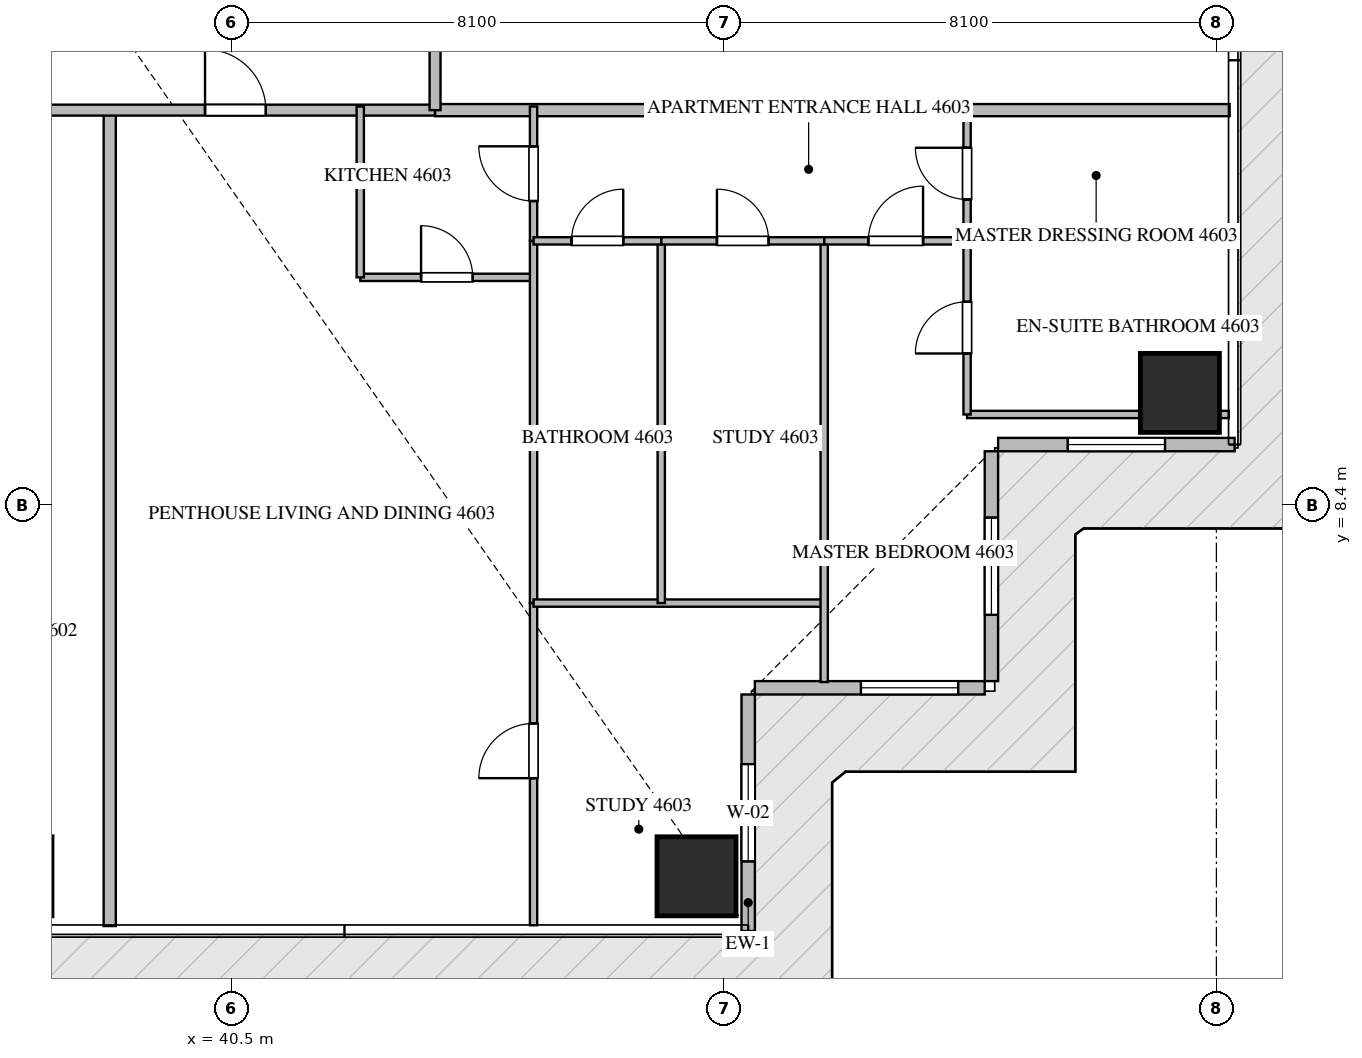
"""IFC4 building model, lengths in metres.
Left out: names, types, materials, properties, quantities, classifications, styles, units other than length and angle.
Written with IfcOpenShell. Run it as: python <this file> out.ifc"""

import sys

from ifc_helpers import new_model, si_unit, direction, frame, frame_2d, origin, origin_2d, place, context, subcontext, project, spatial, rectangle, extrude, source, transform, mapped, element, fill, save


model = new_model("IFC4")
c1 = context("Model", 3, precision=1e-05, world=origin(), true_north=direction((0.0, 1.0)))
c2 = subcontext(c1, "Body", "Model", "MODEL_VIEW")
j1 = project(units=[si_unit("LENGTHUNIT", "METRE"), si_unit("PLANEANGLEUNIT", "RADIAN")], contexts=[c1])
p1 = place(None, origin())
s1 = spatial("IfcSite", under=j1, at=p1, CompositionType="ELEMENT")
p2 = place(p1, origin())
s2 = spatial("IfcBuilding", under=s1, at=p2, CompositionType="ELEMENT")
p3 = place(p2, frame((0.0, 0.0, 183.9)))
s3 = spatial("IfcBuildingStorey", under=s2, at=p3, CompositionType="ELEMENT", Elevation=183.9)
m1 = source(origin(), c2, "Body", "SweptSolid", [
    extrude(rectangle(XDim=1.3, YDim=1.3, at=origin_2d()), origin(), (0.0, 0.0, 1.0), 3.75),
])
for number, where, z_axis, x_axis in (
    (1, (48.15, 2.3, -0.26), (0.0, 0.0, 1.0), (1.0, 0.0, 0.0)),
    (2, (56.1, 10.25, -0.26), (0.0, 0.0, 1.0), (1.0, 0.0, 0.0)),
):
    element("IfcColumn", number, at=place(p3, frame(where, z_axis=z_axis, x_axis=x_axis)), inside=s3, PredefinedType="COLUMN", context=c2, shape_type="MappedRepresentation", body=[
        mapped(m1, transform((0.0, 0.0, 0.0), scale=1.0)),
    ])
p4 = place(p3, frame((49.0, 1.4, 0.0), z_axis=(0.0, 0.0, 1.0), x_axis=(0.0, 1.0, 0.0)))
e3 = element("IfcWall", 3, at=p4, inside=s3, PredefinedType="ELEMENTEDWALL", context=c2, shape_type="SweptSolid", body=[
    extrude(rectangle(XDim=3.89, YDim=0.22, at=frame_2d((1.945, 0.0))), origin(), (0.0, 0.0, 1.0), 3.475),
])
p5 = place(p4, frame((1.145, 0.0, 0.65)))
e4 = element("IfcOpeningElement", 4, at=p5, cuts=e3, PredefinedType="OPENING", context=c2, shape_type="SweptSolid", body=[
    extrude(rectangle(XDim=1.6, YDim=2.1, at=frame_2d((0.8, 1.05))), frame((0.0, 0.12, 0.0), z_axis=(0.0, -1.0, 0.0), x_axis=(1.0, 0.0, 0.0)), (0.0, 0.0, 1.0), 0.24),
])
p6 = place(p3, frame((49.11, 5.4, 0.0), z_axis=(0.0, 0.0, 1.0), x_axis=(1.0, 0.0, 0.0)))
e5 = element("IfcWall", 5, at=p6, inside=s3, PredefinedType="ELEMENTEDWALL", context=c2, shape_type="SweptSolid", body=[
    extrude(rectangle(XDim=3.78, YDim=0.22, at=frame_2d((1.89, 0.0))), origin(), (0.0, 0.0, 1.0), 3.475),
])
p7 = place(p6, frame((1.744, 0.0, 0.65)))
e6 = element("IfcOpeningElement", 6, at=p7, cuts=e5, PredefinedType="OPENING", context=c2, shape_type="SweptSolid", body=[
    extrude(rectangle(XDim=1.6, YDim=2.1, at=frame_2d((0.8, 1.05))), frame((0.0, 0.12, 0.0), z_axis=(0.0, -1.0, 0.0), x_axis=(1.0, 0.0, 0.0)), (0.0, 0.0, 1.0), 0.24),
])
p8 = place(p3, frame((53.0, 5.51, 0.0), z_axis=(0.0, 0.0, 1.0), x_axis=(0.0, 1.0, 0.0)))
e7 = element("IfcWall", 7, at=p8, inside=s3, PredefinedType="ELEMENTEDWALL", context=c2, shape_type="SweptSolid", body=[
    extrude(rectangle(XDim=3.78, YDim=0.22, at=frame_2d((1.89, 0.0))), origin(), (0.0, 0.0, 1.0), 3.475),
])
p9 = place(p8, frame((1.09, 0.0, 0.65)))
e8 = element("IfcOpeningElement", 8, at=p9, cuts=e7, PredefinedType="OPENING", context=c2, shape_type="SweptSolid", body=[
    extrude(rectangle(XDim=1.6, YDim=2.1, at=frame_2d((0.8, 1.05))), frame((0.0, 0.12, 0.0), z_axis=(0.0, -1.0, 0.0), x_axis=(1.0, 0.0, 0.0)), (0.0, 0.0, 1.0), 0.24),
])
p10 = place(p3, frame((53.11, 9.4, 0.0), z_axis=(0.0, 0.0, 1.0), x_axis=(1.0, 0.0, 0.0)))
e9 = element("IfcWall", 9, at=p10, inside=s3, PredefinedType="ELEMENTEDWALL", context=c2, shape_type="SweptSolid", body=[
    extrude(rectangle(XDim=3.89, YDim=0.22, at=frame_2d((1.945, 0.0))), origin(), (0.0, 0.0, 1.0), 3.475),
])
p11 = place(p10, frame((1.145, 0.0, 0.65)))
e10 = element("IfcOpeningElement", 10, at=p11, cuts=e9, PredefinedType="OPENING", context=c2, shape_type="SweptSolid", body=[
    extrude(rectangle(XDim=1.6, YDim=2.1, at=frame_2d((0.8, 1.05))), frame((0.0, 0.12, 0.0), z_axis=(0.0, -1.0, 0.0), x_axis=(1.0, 0.0, 0.0)), (0.0, 0.0, 1.0), 0.24),
])
p12 = place(p3, frame((38.5, 1.482, 0.0), z_axis=(0.0, 0.0, 1.0), x_axis=(0.0, 1.0, 0.0)))
e11 = element("IfcWall", 11, at=p12, inside=s3, PredefinedType="PARTITIONING", context=c2, shape_type="SweptSolid", body=[
    extrude(rectangle(XDim=13.418, YDim=0.2, at=frame_2d((6.709, 0.0))), origin(), (0.0, 0.0, 1.0), 3.49),
])
p13 = place(p3, frame((43.85, 14.9, 0.0), z_axis=(0.0, 0.0, 1.0), x_axis=(1.0, 0.0, 0.0)))
e12 = element("IfcWall", 12, at=p13, inside=s3, PredefinedType="PARTITIONING", context=c2, shape_type="SweptSolid", body=[
    extrude(rectangle(XDim=13.068, YDim=0.2, at=frame_2d((6.534, 0.0))), origin(), (0.0, 0.0, 1.0), 3.49),
])
p14 = place(p3, frame((20.952, 14.9, 0.0), z_axis=(0.0, 0.0, 1.0), x_axis=(1.0, 0.0, 0.0)))
e13 = element("IfcWall", 13, at=p14, inside=s3, PredefinedType="PARTITIONING", context=c2, shape_type="SweptSolid", body=[
    extrude(rectangle(XDim=22.896, YDim=0.18, at=frame_2d((11.448, 0.0))), origin(), (0.0, 0.0, 1.0), 3.49),
])
p15 = place(p14, frame((2.781, 0.0, 0.0)))
e14 = element("IfcOpeningElement", 14, at=p15, cuts=e13, PredefinedType="OPENING", context=c2, shape_type="SweptSolid", body=[
    extrude(rectangle(XDim=1.0, YDim=2.15, at=frame_2d((0.5, 1.075))), frame((0.0, 0.1, 0.0), z_axis=(0.0, -1.0, 0.0), x_axis=(1.0, 0.0, 0.0)), (0.0, 0.0, 1.0), 0.2),
])
p16 = place(p14, frame((14.736, 0.0, 0.0)))
e15 = element("IfcOpeningElement", 15, at=p16, cuts=e13, PredefinedType="OPENING", context=c2, shape_type="SweptSolid", body=[
    extrude(rectangle(XDim=1.0, YDim=2.15, at=frame_2d((0.5, 1.075))), frame((0.0, 0.1, 0.0), z_axis=(0.0, -1.0, 0.0), x_axis=(1.0, 0.0, 0.0)), (0.0, 0.0, 1.0), 0.2),
])
p17 = place(p14, frame((19.115, 0.0, 0.0)))
e16 = element("IfcOpeningElement", 16, at=p17, cuts=e13, PredefinedType="OPENING", context=c2, shape_type="SweptSolid", body=[
    extrude(rectangle(XDim=1.0, YDim=2.15, at=frame_2d((0.5, 1.075))), frame((0.0, 0.1, 0.0), z_axis=(0.0, -1.0, 0.0), x_axis=(1.0, 0.0, 0.0)), (0.0, 0.0, 1.0), 0.2),
])
p18 = place(p3, frame((43.85, 14.9, 0.0), z_axis=(0.0, 0.0, 1.0), x_axis=(0.0, 1.0, 0.0)))
e17 = element("IfcWall", 17, at=p18, inside=s3, PredefinedType="PARTITIONING", context=c2, shape_type="SweptSolid", body=[
    extrude(rectangle(XDim=18.7, YDim=0.18, at=frame_2d((9.35, 0.0))), origin(), (0.0, 0.0, 1.0), 3.49),
])
p19 = place(p18, frame((1.805, 0.0, 0.0)))
e18 = element("IfcOpeningElement", 18, at=p19, cuts=e17, PredefinedType="OPENING", context=c2, shape_type="SweptSolid", body=[
    extrude(rectangle(XDim=1.0, YDim=2.15, at=frame_2d((0.5, 1.075))), frame((0.0, 0.1, 0.0), z_axis=(0.0, -1.0, 0.0), x_axis=(1.0, 0.0, 0.0)), (0.0, 0.0, 1.0), 0.2),
])
p20 = place(p18, frame((14.726, 0.0, 0.0)))
e19 = element("IfcOpeningElement", 19, at=p20, cuts=e17, PredefinedType="OPENING", context=c2, shape_type="SweptSolid", body=[
    extrude(rectangle(XDim=1.0, YDim=2.15, at=frame_2d((0.5, 1.075))), frame((0.0, 0.1, 0.0), z_axis=(0.0, -1.0, 0.0), x_axis=(1.0, 0.0, 0.0)), (0.0, 0.0, 1.0), 0.2),
])
p21 = place(p3, frame((42.62, 12.15, 0.0), z_axis=(0.0, 0.0, 1.0), x_axis=(1.0, 0.0, 0.0)))
e20 = element("IfcWall", 20, at=p21, inside=s3, PredefinedType="PARTITIONING", context=c2, shape_type="SweptSolid", body=[
    extrude(rectangle(XDim=2.85, YDim=0.12, at=frame_2d((1.425, 0.0))), origin(), (0.0, 0.0, 1.0), 3.49),
])
p22 = place(p21, frame((1.0, 0.0, 0.0)))
e21 = element("IfcOpeningElement", 21, at=p22, cuts=e20, PredefinedType="OPENING", context=c2, shape_type="SweptSolid", body=[
    extrude(rectangle(XDim=0.85, YDim=2.1, at=frame_2d((0.425, 1.05))), frame((0.0, 0.07, 0.0), z_axis=(0.0, -1.0, 0.0), x_axis=(1.0, 0.0, 0.0)), (0.0, 0.0, 1.0), 0.14),
])
p23 = place(p3, frame((42.62, 12.15, 0.0), z_axis=(0.0, 0.0, 1.0), x_axis=(0.0, 1.0, 0.0)))
e22 = element("IfcWall", 22, at=p23, inside=s3, PredefinedType="PARTITIONING", context=c2, shape_type="SweptSolid", body=[
    extrude(rectangle(XDim=2.81, YDim=0.12, at=frame_2d((1.405, 0.0))), origin(), (0.0, 0.0, 1.0), 3.49),
])
p24 = place(p3, frame((45.47, 12.75, 0.0), z_axis=(0.0, 0.0, 1.0), x_axis=(0.0, 1.0, 0.0)))
e23 = element("IfcWall", 23, at=p24, inside=s3, PredefinedType="PARTITIONING", context=c2, shape_type="SweptSolid", body=[
    extrude(rectangle(XDim=2.21, YDim=0.12, at=frame_2d((1.105, 0.0))), origin(), (0.0, 0.0, 1.0), 3.49),
])
p25 = place(p24, frame((0.655, 0.0, 0.0)))
e24 = element("IfcOpeningElement", 24, at=p25, cuts=e23, PredefinedType="OPENING", context=c2, shape_type="SweptSolid", body=[
    extrude(rectangle(XDim=0.9, YDim=2.1, at=frame_2d((0.45, 1.05))), frame((0.0, 0.07, 0.0), z_axis=(0.0, -1.0, 0.0), x_axis=(1.0, 0.0, 0.0)), (0.0, 0.0, 1.0), 0.14),
])
p26 = place(p3, frame((45.47, 1.495, 0.0), z_axis=(0.0, 0.0, 1.0), x_axis=(0.0, 1.0, 0.0)))
e25 = element("IfcWall", 25, at=p26, inside=s3, PredefinedType="PARTITIONING", context=c2, shape_type="SweptSolid", body=[
    extrude(rectangle(XDim=5.298, YDim=0.12, at=frame_2d((2.649, 0.0))), origin(), (0.0, 0.0, 1.0), 3.49),
])
p27 = place(p26, frame((2.419, 0.0, 0.0)))
e26 = element("IfcOpeningElement", 26, at=p27, cuts=e25, PredefinedType="OPENING", context=c2, shape_type="SweptSolid", body=[
    extrude(rectangle(XDim=0.9, YDim=2.1, at=frame_2d((0.45, 1.05))), frame((0.0, 0.07, 0.0), z_axis=(0.0, -1.0, 0.0), x_axis=(1.0, 0.0, 0.0)), (0.0, 0.0, 1.0), 0.14),
])
p28 = place(p3, frame((45.47, 6.795, 0.0), z_axis=(0.0, 0.0, 1.0), x_axis=(0.0, 1.0, 0.0)))
e27 = element("IfcWall", 27, at=p28, inside=s3, PredefinedType="PARTITIONING", context=c2, shape_type="SweptSolid", body=[
    extrude(rectangle(XDim=5.953, YDim=0.12, at=frame_2d((2.977, 0.0))), origin(), (0.0, 0.0, 1.0), 3.49),
])
p29 = place(p3, frame((45.47, 6.793, 0.0), z_axis=(0.0, 0.0, 1.0), x_axis=(1.0, 0.0, 0.0)))
e28 = element("IfcWall", 28, at=p29, inside=s3, PredefinedType="PARTITIONING", context=c2, shape_type="SweptSolid", body=[
    extrude(rectangle(XDim=4.78, YDim=0.12, at=frame_2d((2.39, 0.0))), origin(), (0.0, 0.0, 1.0), 3.49),
])
p30 = place(p3, frame((50.25, 5.495, 0.0), z_axis=(0.0, 0.0, 1.0), x_axis=(0.0, 1.0, 0.0)))
e29 = element("IfcWall", 29, at=p30, inside=s3, PredefinedType="PARTITIONING", context=c2, shape_type="SweptSolid", body=[
    extrude(rectangle(XDim=7.255, YDim=0.12, at=frame_2d((3.627, 0.0))), origin(), (0.0, 0.0, 1.0), 3.49),
])
p31 = place(p3, frame((47.57, 6.793, 0.0), z_axis=(0.0, 0.0, 1.0), x_axis=(0.0, 1.0, 0.0)))
e30 = element("IfcWall", 30, at=p31, inside=s3, PredefinedType="PARTITIONING", context=c2, shape_type="SweptSolid", body=[
    extrude(rectangle(XDim=5.957, YDim=0.12, at=frame_2d((2.979, 0.0))), origin(), (0.0, 0.0, 1.0), 3.49),
])
p32 = place(p3, frame((45.47, 12.75, 0.0), z_axis=(0.0, 0.0, 1.0), x_axis=(1.0, 0.0, 0.0)))
e31 = element("IfcWall", 31, at=p32, inside=s3, PredefinedType="PARTITIONING", context=c2, shape_type="SweptSolid", body=[
    extrude(rectangle(XDim=2.1, YDim=0.12, at=frame_2d((1.05, 0.0))), origin(), (0.0, 0.0, 1.0), 3.49),
])
p33 = place(p32, frame((0.625, 0.0, 0.0)))
e32 = element("IfcOpeningElement", 32, at=p33, cuts=e31, PredefinedType="OPENING", context=c2, shape_type="SweptSolid", body=[
    extrude(rectangle(XDim=0.85, YDim=2.1, at=frame_2d((0.425, 1.05))), frame((0.0, 0.07, 0.0), z_axis=(0.0, -1.0, 0.0), x_axis=(1.0, 0.0, 0.0)), (0.0, 0.0, 1.0), 0.14),
])
p34 = place(p3, frame((47.572, 12.75, 0.0), z_axis=(0.0, 0.0, 1.0), x_axis=(1.0, 0.0, 0.0)))
e33 = element("IfcWall", 33, at=p34, inside=s3, PredefinedType="PARTITIONING", context=c2, shape_type="SweptSolid", body=[
    extrude(rectangle(XDim=2.678, YDim=0.12, at=frame_2d((1.339, 0.0))), origin(), (0.0, 0.0, 1.0), 3.49),
])
p35 = place(p34, frame((0.914, 0.0, 0.0)))
e34 = element("IfcOpeningElement", 34, at=p35, cuts=e33, PredefinedType="OPENING", context=c2, shape_type="SweptSolid", body=[
    extrude(rectangle(XDim=0.85, YDim=2.1, at=frame_2d((0.425, 1.05))), frame((0.0, 0.07, 0.0), z_axis=(0.0, -1.0, 0.0), x_axis=(1.0, 0.0, 0.0)), (0.0, 0.0, 1.0), 0.14),
])
p36 = place(p3, frame((50.252, 12.75, 0.0), z_axis=(0.0, 0.0, 1.0), x_axis=(1.0, 0.0, 0.0)))
e35 = element("IfcWall", 35, at=p36, inside=s3, PredefinedType="PARTITIONING", context=c2, shape_type="SweptSolid", body=[
    extrude(rectangle(XDim=2.348, YDim=0.12, at=frame_2d((1.174, 0.0))), origin(), (0.0, 0.0, 1.0), 3.49),
])
p37 = place(p36, frame((0.724, 0.0, 0.0)))
e36 = element("IfcOpeningElement", 36, at=p37, cuts=e35, PredefinedType="OPENING", context=c2, shape_type="SweptSolid", body=[
    extrude(rectangle(XDim=0.9, YDim=2.1, at=frame_2d((0.45, 1.05))), frame((0.0, 0.07, 0.0), z_axis=(0.0, -1.0, 0.0), x_axis=(1.0, 0.0, 0.0)), (0.0, 0.0, 1.0), 0.14),
])
p38 = place(p3, frame((52.6, 9.895, 0.0), z_axis=(0.0, 0.0, 1.0), x_axis=(1.0, 0.0, 0.0)))
e37 = element("IfcWall", 37, at=p38, inside=s3, PredefinedType="PARTITIONING", context=c2, shape_type="SweptSolid", body=[
    extrude(rectangle(XDim=4.305, YDim=0.12, at=frame_2d((2.152, 0.0))), origin(), (0.0, 0.0, 1.0), 3.49),
])
p39 = place(p3, frame((52.602, 12.75, 0.0), z_axis=(0.0, 0.0, 1.0), x_axis=(1.0, 0.0, 0.0)))
e38 = element("IfcWall", 38, at=p39, inside=s3, PredefinedType="PARTITIONING", context=c2, shape_type="SweptSolid", body=[
    extrude(rectangle(XDim=4.303, YDim=0.12, at=frame_2d((2.151, 0.0))), origin(), (0.0, 0.0, 1.0), 3.49),
])
p40 = place(p3, frame((52.6, 9.895, 0.0), z_axis=(0.0, 0.0, 1.0), x_axis=(0.0, 1.0, 0.0)))
e39 = element("IfcWall", 39, at=p40, inside=s3, PredefinedType="PARTITIONING", context=c2, shape_type="SweptSolid", body=[
    extrude(rectangle(XDim=2.855, YDim=0.12, at=frame_2d((1.427, 0.0))), origin(), (0.0, 0.0, 1.0), 3.49),
])
p41 = place(p40, frame((1.003, 0.0, 0.0)))
e40 = element("IfcOpeningElement", 40, at=p41, cuts=e39, PredefinedType="OPENING", context=c2, shape_type="SweptSolid", body=[
    extrude(rectangle(XDim=0.85, YDim=2.1, at=frame_2d((0.425, 1.05))), frame((0.0, 0.07, 0.0), z_axis=(0.0, -1.0, 0.0), x_axis=(1.0, 0.0, 0.0)), (0.0, 0.0, 1.0), 0.14),
])
p42 = place(p3, frame((52.6, 12.752, 0.0), z_axis=(0.0, 0.0, 1.0), x_axis=(0.0, 1.0, 0.0)))
e41 = element("IfcWall", 41, at=p42, inside=s3, PredefinedType="PARTITIONING", context=c2, shape_type="SweptSolid", body=[
    extrude(rectangle(XDim=2.208, YDim=0.12, at=frame_2d((1.104, 0.0))), origin(), (0.0, 0.0, 1.0), 3.49),
])
p43 = place(p42, frame((0.679, 0.0, 0.0)))
e42 = element("IfcOpeningElement", 42, at=p43, cuts=e41, PredefinedType="OPENING", context=c2, shape_type="SweptSolid", body=[
    extrude(rectangle(XDim=0.85, YDim=2.1, at=frame_2d((0.425, 1.05))), frame((0.0, 0.07, 0.0), z_axis=(0.0, -1.0, 0.0), x_axis=(1.0, 0.0, 0.0)), (0.0, 0.0, 1.0), 0.14),
])
m2 = source(origin(), c2, "Body", "SweptSolid", [
    extrude(rectangle(XDim=1.6, YDim=2.1, at=frame_2d((0.8, 1.05))), frame((0.0, 0.03, 0.0), z_axis=(0.0, -1.0, 0.0), x_axis=(1.0, 0.0, 0.0)), (0.0, 0.0, 1.0), 0.06),
])
p44 = place(p5, origin())
e43 = element("IfcWindow", 43, at=p44, inside=s3, PartitioningType="SINGLE_PANEL", PredefinedType="WINDOW", context=c2, shape_type="MappedRepresentation", body=[
    mapped(m2, transform((0.0, 0.0, 0.0), scale=1.0)),
])
fill(e4, e43)
p45 = place(p7, origin())
e44 = element("IfcWindow", 44, at=p45, inside=s3, PartitioningType="SINGLE_PANEL", PredefinedType="WINDOW", context=c2, shape_type="MappedRepresentation", body=[
    mapped(m2, transform((0.0, 0.0, 0.0), scale=1.0)),
])
fill(e6, e44)
p46 = place(p9, origin())
e45 = element("IfcWindow", 45, at=p46, inside=s3, PartitioningType="SINGLE_PANEL", PredefinedType="WINDOW", context=c2, shape_type="MappedRepresentation", body=[
    mapped(m2, transform((0.0, 0.0, 0.0), scale=1.0)),
])
fill(e8, e45)
p47 = place(p11, origin())
e46 = element("IfcWindow", 46, at=p47, inside=s3, PartitioningType="SINGLE_PANEL", PredefinedType="WINDOW", context=c2, shape_type="MappedRepresentation", body=[
    mapped(m2, transform((0.0, 0.0, 0.0), scale=1.0)),
])
fill(e10, e46)
m3 = source(origin(), c2, "Body", "SweptSolid", [
    extrude(rectangle(XDim=1.0, YDim=2.15, at=frame_2d((0.5, 1.075))), frame((0.0, 0.025, 0.0), z_axis=(0.0, -1.0, 0.0), x_axis=(1.0, 0.0, 0.0)), (0.0, 0.0, 1.0), 0.05),
])
p48 = place(p17, origin())
e47 = element("IfcDoor", 47, at=p48, inside=s3, OperationType="SINGLE_SWING_LEFT", PredefinedType="DOOR", context=c2, shape_type="MappedRepresentation", body=[
    mapped(m3, transform((0.0, 0.0, 0.0), scale=1.0)),
])
fill(e16, e47)
m4 = source(origin(), c2, "Body", "SweptSolid", [
    extrude(rectangle(XDim=0.85, YDim=2.1, at=frame_2d((0.425, 1.05))), frame((0.0, 0.025, 0.0), z_axis=(0.0, -1.0, 0.0), x_axis=(1.0, 0.0, 0.0)), (0.0, 0.0, 1.0), 0.05),
])
p49 = place(p22, origin())
e48 = element("IfcDoor", 48, at=p49, inside=s3, OperationType="SINGLE_SWING_LEFT", PredefinedType="DOOR", context=c2, shape_type="MappedRepresentation", body=[
    mapped(m4, transform((0.0, 0.0, 0.0), scale=1.0)),
])
fill(e21, e48)
m5 = source(origin(), c2, "Body", "SweptSolid", [
    extrude(rectangle(XDim=0.9, YDim=2.1, at=frame_2d((0.45, 1.05))), frame((0.0, 0.025, 0.0), z_axis=(0.0, -1.0, 0.0), x_axis=(1.0, 0.0, 0.0)), (0.0, 0.0, 1.0), 0.05),
])
p50 = place(p25, origin())
e49 = element("IfcDoor", 49, at=p50, inside=s3, OperationType="SINGLE_SWING_RIGHT", PredefinedType="DOOR", context=c2, shape_type="MappedRepresentation", body=[
    mapped(m5, transform((0.0, 0.0, 0.0), scale=1.0)),
])
fill(e24, e49)
p51 = place(p27, origin())
e50 = element("IfcDoor", 50, at=p51, inside=s3, OperationType="SINGLE_SWING_LEFT", PredefinedType="DOOR", context=c2, shape_type="MappedRepresentation", body=[
    mapped(m5, transform((0.0, 0.0, 0.0), scale=1.0)),
])
fill(e26, e50)
p52 = place(p33, origin())
e51 = element("IfcDoor", 51, at=p52, inside=s3, OperationType="SINGLE_SWING_RIGHT", PredefinedType="DOOR", context=c2, shape_type="MappedRepresentation", body=[
    mapped(m4, transform((0.0, 0.0, 0.0), scale=1.0)),
])
fill(e32, e51)
p53 = place(p35, origin())
e52 = element("IfcDoor", 52, at=p53, inside=s3, OperationType="SINGLE_SWING_LEFT", PredefinedType="DOOR", context=c2, shape_type="MappedRepresentation", body=[
    mapped(m4, transform((0.0, 0.0, 0.0), scale=1.0)),
])
fill(e34, e52)
p54 = place(p37, origin())
e53 = element("IfcDoor", 53, at=p54, inside=s3, OperationType="SINGLE_SWING_RIGHT", PredefinedType="DOOR", context=c2, shape_type="MappedRepresentation", body=[
    mapped(m5, transform((0.0, 0.0, 0.0), scale=1.0)),
])
fill(e36, e53)
p55 = place(p41, origin())
e54 = element("IfcDoor", 54, at=p55, inside=s3, OperationType="SINGLE_SWING_LEFT", PredefinedType="DOOR", context=c2, shape_type="MappedRepresentation", body=[
    mapped(m4, transform((0.0, 0.0, 0.0), scale=1.0)),
])
fill(e40, e54)
p56 = place(p43, origin())
e55 = element("IfcDoor", 55, at=p56, inside=s3, OperationType="SINGLE_SWING_RIGHT", PredefinedType="DOOR", context=c2, shape_type="MappedRepresentation", body=[
    mapped(m4, transform((0.0, 0.0, 0.0), scale=1.0)),
])
fill(e42, e55)
save(model, sys.argv[1])
